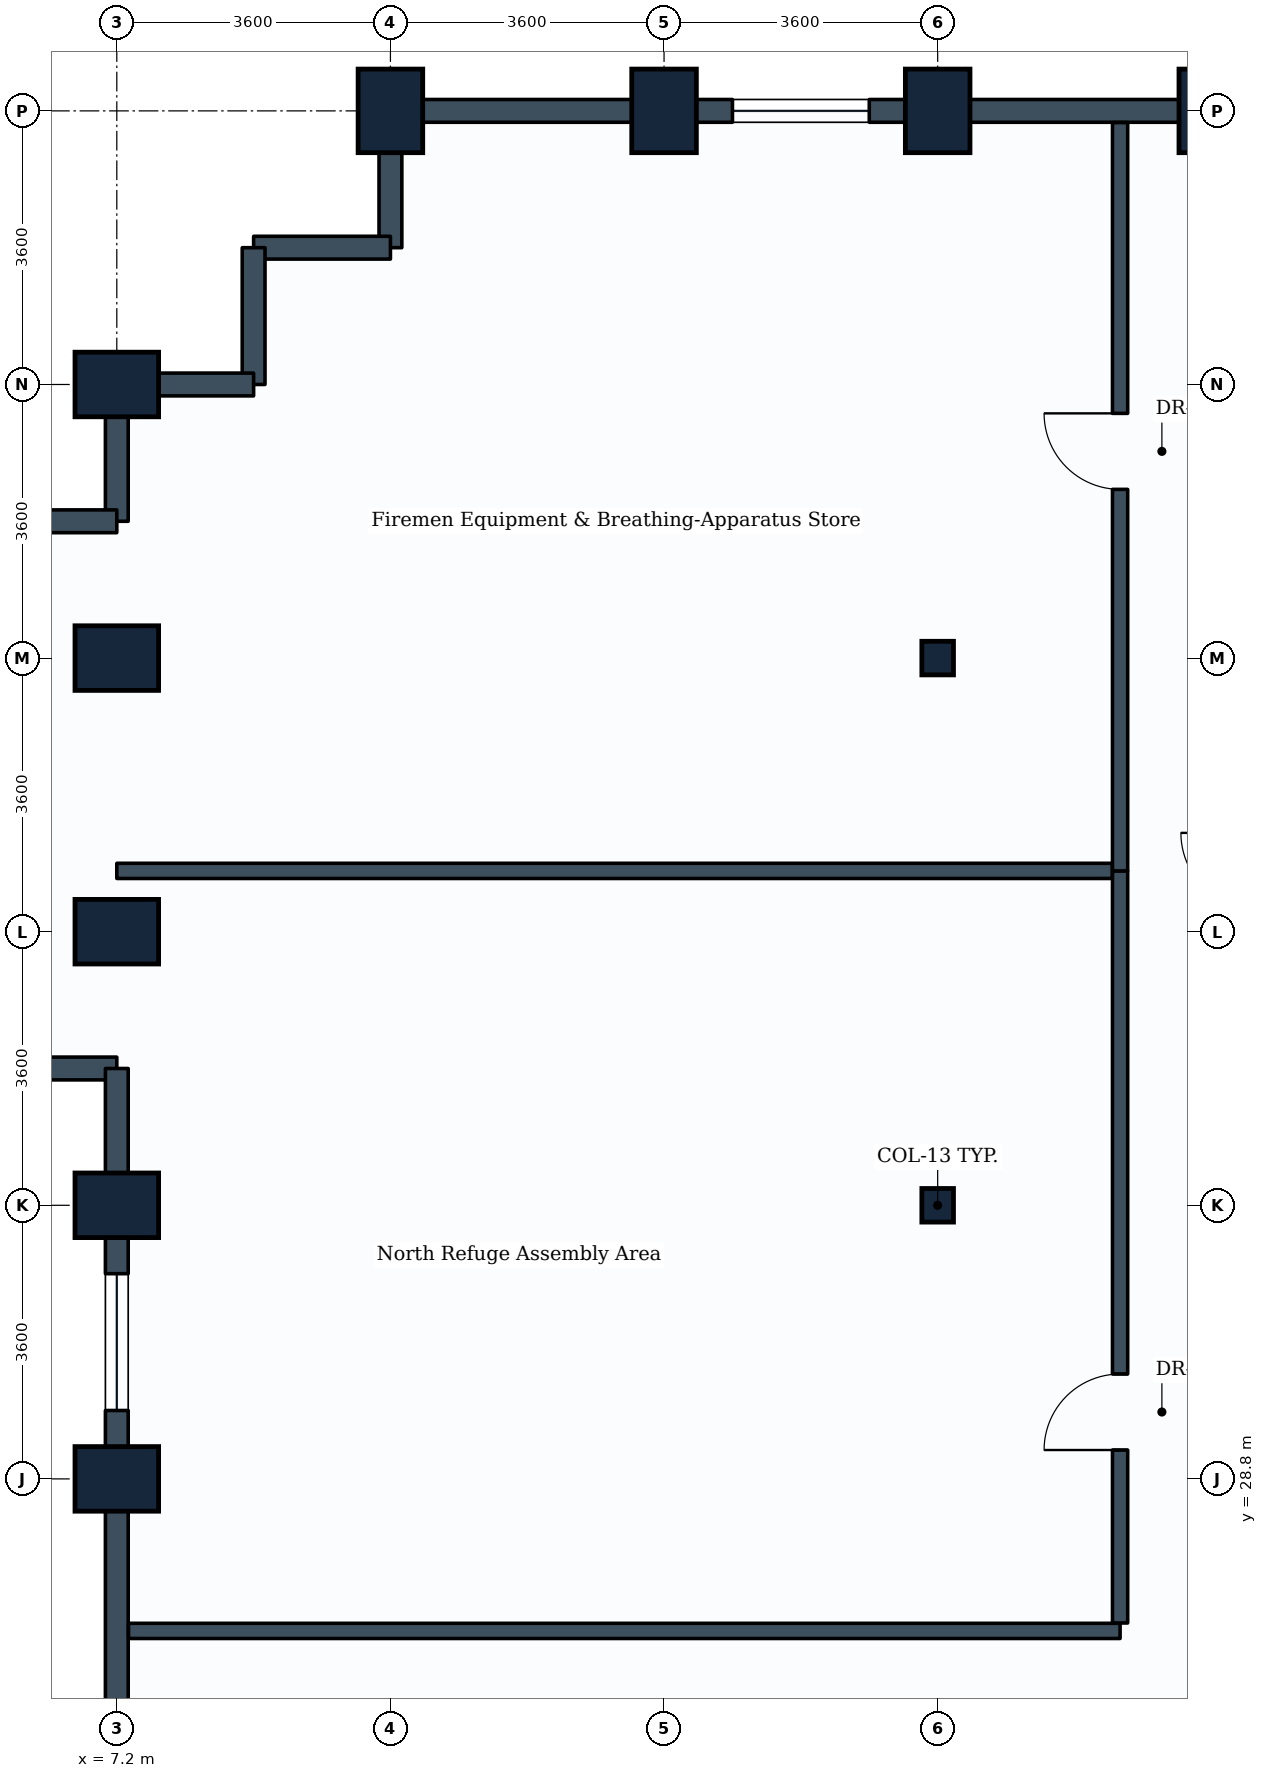
"""IFC4 building model, lengths in metres.
Left out: names, types, materials, properties, quantities, classifications, styles, units other than length and angle.
Written with IfcOpenShell. Run it as: python <this file> out.ifc"""

import sys

from ifc_helpers import new_model, si_unit, direction, frame, frame_2d, origin, origin_2d, place, context, subcontext, project, spatial, rectangle, i_section, extrude, element, fill, save


model = new_model("IFC4")
c1 = context("Model", 3, precision=1e-05, world=origin(), true_north=direction((0.0, 1.0)))
c2 = subcontext(c1, "Body", "Model", "MODEL_VIEW")
j1 = project(units=[si_unit("LENGTHUNIT", "METRE"), si_unit("PLANEANGLEUNIT", "RADIAN")], contexts=[c1])
p1 = place(None, origin())
s1 = spatial("IfcSite", under=j1, at=p1, CompositionType="ELEMENT")
p2 = place(p1, origin())
s2 = spatial("IfcBuilding", under=s1, at=p2, CompositionType="ELEMENT")
p3 = place(p2, frame((0.0, 0.0, 120.0)))
s3 = spatial("IfcBuildingStorey", under=s2, at=p3, CompositionType="ELEMENT", Elevation=120.0)
for number, where, z_axis, x_axis in (
    (1, (7.2, 28.8, 0.0), (0.0, 0.0, 1.0), (0.0, 1.0, 0.0)),
    (2, (7.2, 32.4, 0.0), (0.0, 0.0, 1.0), (0.0, 1.0, 0.0)),
    (3, (7.2, 36.0, 0.0), (0.0, 0.0, 1.0), (0.0, 1.0, 0.0)),
    (4, (7.2, 39.6, 0.0), (0.0, 0.0, 1.0), (0.0, 1.0, 0.0)),
    (5, (7.2, 43.2, 0.0), (0.0, 0.0, 1.0), (0.0, 1.0, 0.0)),
    (6, (10.8, 46.8, 0.0), (0.0, 0.0, 1.0), (1.0, 0.0, 0.0)),
    (7, (14.4, 46.8, 0.0), (0.0, 0.0, 1.0), (1.0, 0.0, 0.0)),
):
    element("IfcColumn", number, at=place(p3, frame(where, z_axis=z_axis, x_axis=x_axis)), inside=s3, PredefinedType="COLUMN", context=c2, shape_type="SweptSolid", body=[
        extrude(rectangle(XDim=0.85, YDim=1.1, at=origin_2d()), origin(), (0.0, 0.0, 1.0), 3.8),
    ])
for number, where, z_axis, x_axis in (
    (8, (18.0, 32.4, 0.0), (0.0, 0.0, 1.0), (1.0, 0.0, 0.0)),
    (9, (18.0, 39.6, 0.0), (0.0, 0.0, 1.0), (1.0, 0.0, 0.0)),
):
    element("IfcColumn", number, at=place(p3, frame(where, z_axis=z_axis, x_axis=x_axis)), inside=s3, PredefinedType="COLUMN", context=c2, shape_type="SweptSolid", body=[
        extrude(i_section(OverallWidth=0.416, OverallDepth=0.442, WebThickness=0.025, FlangeThickness=0.041, FilletRadius=0.015, at=origin_2d()), origin(), (0.0, 0.0, 1.0), 3.8),
    ])
for number, where, z_axis, x_axis in (
    (10, (18.0, 46.8, 0.0), (0.0, 0.0, 1.0), (1.0, 0.0, 0.0)),
    (11, (21.6, 46.8, 0.0), (0.0, 0.0, 1.0), (1.0, 0.0, 0.0)),
):
    element("IfcColumn", number, at=place(p3, frame(where, z_axis=z_axis, x_axis=x_axis)), inside=s3, PredefinedType="COLUMN", context=c2, shape_type="SweptSolid", body=[
        extrude(rectangle(XDim=0.85, YDim=1.1, at=origin_2d()), origin(), (0.0, 0.0, 1.0), 3.8),
    ])
p4 = place(p3, frame((18.0, 46.8, 0.0), z_axis=(0.0, 0.0, 1.0), x_axis=(1.0, 0.0, 0.0)))
e12 = element("IfcWall", 12, at=p4, inside=s3, PredefinedType="STANDARD", context=c2, shape_type="SweptSolid", body=[
    extrude(rectangle(XDim=3.6, YDim=0.3, at=frame_2d((1.8, 0.0))), origin(), (0.0, 0.0, 1.0), 2.93),
])
p5 = place(p3, frame((14.4, 46.8, 0.0), z_axis=(0.0, 0.0, 1.0), x_axis=(1.0, 0.0, 0.0)))
e13 = element("IfcWall", 13, at=p5, inside=s3, PredefinedType="STANDARD", context=c2, shape_type="SweptSolid", body=[
    extrude(rectangle(XDim=3.6, YDim=0.3, at=frame_2d((1.8, 0.0))), origin(), (0.0, 0.0, 1.0), 2.93),
])
p6 = place(p5, frame((0.9, 0.0, 0.85)))
e14 = element("IfcOpeningElement", 14, at=p6, cuts=e13, PredefinedType="OPENING", context=c2, shape_type="SweptSolid", body=[
    extrude(rectangle(XDim=1.8, YDim=1.35, at=frame_2d((0.9, 0.675))), frame((0.0, 0.16, 0.0), z_axis=(0.0, -1.0, 0.0), x_axis=(1.0, 0.0, 0.0)), (0.0, 0.0, 1.0), 0.32),
])
p7 = place(p3, frame((10.8, 46.8, 0.0), z_axis=(0.0, 0.0, 1.0), x_axis=(1.0, 0.0, 0.0)))
e15 = element("IfcWall", 15, at=p7, inside=s3, PredefinedType="STANDARD", context=c2, shape_type="SweptSolid", body=[
    extrude(rectangle(XDim=3.6, YDim=0.3, at=frame_2d((1.8, 0.0))), origin(), (0.0, 0.0, 1.0), 2.93),
])
p8 = place(p3, frame((10.8, 45.0, 0.0), z_axis=(0.0, 0.0, 1.0), x_axis=(0.0, 1.0, 0.0)))
e16 = element("IfcWall", 16, at=p8, inside=s3, PredefinedType="STANDARD", context=c2, shape_type="SweptSolid", body=[
    extrude(rectangle(XDim=1.8, YDim=0.3, at=frame_2d((0.9, 0.0))), origin(), (0.0, 0.0, 1.0), 2.93),
])
for number, where, z_axis, x_axis in (
    (17, (9.0, 45.0, 0.0), (0.0, 0.0, 1.0), (1.0, 0.0, 0.0)),
    (18, (9.0, 43.2, 0.0), (0.0, 0.0, 1.0), (0.0, 1.0, 0.0)),
):
    element("IfcWall", number, at=place(p3, frame(where, z_axis=z_axis, x_axis=x_axis)), inside=s3, PredefinedType="STANDARD", context=c2, shape_type="SweptSolid", body=[
        extrude(rectangle(XDim=1.8, YDim=0.3, at=frame_2d((0.9, 0.0))), origin(), (0.0, 0.0, 1.0), 3.535),
    ])
for number, where, z_axis, x_axis in (
    (19, (7.2, 43.2, 0.0), (0.0, 0.0, 1.0), (1.0, 0.0, 0.0)),
    (20, (7.2, 41.4, 0.0), (0.0, 0.0, 1.0), (0.0, 1.0, 0.0)),
):
    element("IfcWall", number, at=place(p3, frame(where, z_axis=z_axis, x_axis=x_axis)), inside=s3, PredefinedType="STANDARD", context=c2, shape_type="SweptSolid", body=[
        extrude(rectangle(XDim=1.8, YDim=0.3, at=frame_2d((0.9, 0.0))), origin(), (0.0, 0.0, 1.0), 2.93),
    ])
for number, where, z_axis, x_axis in (
    (21, (5.1, 41.4, 0.0), (0.0, 0.0, 1.0), (1.0, 0.0, 0.0)),
    (22, (5.1, 34.2, 0.0), (0.0, 0.0, 1.0), (1.0, 0.0, 0.0)),
):
    element("IfcWall", number, at=place(p3, frame(where, z_axis=z_axis, x_axis=x_axis)), inside=s3, PredefinedType="STANDARD", context=c2, shape_type="SweptSolid", body=[
        extrude(rectangle(XDim=2.1, YDim=0.3, at=frame_2d((1.05, 0.0))), origin(), (0.0, 0.0, 1.0), 2.93),
    ])
p9 = place(p3, frame((7.2, 32.4, 0.0), z_axis=(0.0, 0.0, 1.0), x_axis=(0.0, 1.0, 0.0)))
e23 = element("IfcWall", 23, at=p9, inside=s3, PredefinedType="STANDARD", context=c2, shape_type="SweptSolid", body=[
    extrude(rectangle(XDim=1.8, YDim=0.3, at=frame_2d((0.9, 0.0))), origin(), (0.0, 0.0, 1.0), 2.93),
])
p10 = place(p3, frame((7.2, 28.8, 0.0), z_axis=(0.0, 0.0, 1.0), x_axis=(0.0, 1.0, 0.0)))
e24 = element("IfcWall", 24, at=p10, inside=s3, PredefinedType="STANDARD", context=c2, shape_type="SweptSolid", body=[
    extrude(rectangle(XDim=3.6, YDim=0.3, at=frame_2d((1.8, 0.0))), origin(), (0.0, 0.0, 1.0), 2.93),
])
p11 = place(p10, frame((0.9, 0.0, 0.85)))
e25 = element("IfcOpeningElement", 25, at=p11, cuts=e24, PredefinedType="OPENING", context=c2, shape_type="SweptSolid", body=[
    extrude(rectangle(XDim=1.8, YDim=1.35, at=frame_2d((0.9, 0.675))), frame((0.0, 0.16, 0.0), z_axis=(0.0, -1.0, 0.0), x_axis=(1.0, 0.0, 0.0)), (0.0, 0.0, 1.0), 0.32),
])
p12 = place(p3, frame((7.2, 25.2, 0.0), z_axis=(0.0, 0.0, 1.0), x_axis=(0.0, 1.0, 0.0)))
e26 = element("IfcWall", 26, at=p12, inside=s3, PredefinedType="STANDARD", context=c2, shape_type="SweptSolid", body=[
    extrude(rectangle(XDim=3.6, YDim=0.3, at=frame_2d((1.8, 0.0))), origin(), (0.0, 0.0, 1.0), 2.93),
])
p13 = place(p3, frame((7.354, 26.8, 0.0), z_axis=(0.0, 0.0, 1.0), x_axis=(1.0, 0.0, 0.0)))
e27 = element("IfcWall", 27, at=p13, inside=s3, PredefinedType="PARTITIONING", context=c2, shape_type="SweptSolid", body=[
    extrude(rectangle(XDim=13.046, YDim=0.2, at=frame_2d((6.523, 0.0))), origin(), (0.0, 0.0, 1.0), 2.93),
])
p14 = place(p3, frame((20.4, 26.904, 0.0), z_axis=(0.0, 0.0, 1.0), x_axis=(0.0, 1.0, 0.0)))
e28 = element("IfcWall", 28, at=p14, inside=s3, PredefinedType="PARTITIONING", context=c2, shape_type="SweptSolid", body=[
    extrude(rectangle(XDim=9.896, YDim=0.2, at=frame_2d((4.948, 0.0))), origin(), (0.0, 0.0, 1.0), 3.09),
])
p15 = place(p14, frame((2.276, 0.0, 0.0)))
e29 = element("IfcOpeningElement", 29, at=p15, cuts=e28, PredefinedType="OPENING", context=c2, shape_type="SweptSolid", body=[
    extrude(rectangle(XDim=1.0, YDim=2.1, at=frame_2d((0.5, 1.05))), frame((0.0, 0.11, 0.0), z_axis=(0.0, -1.0, 0.0), x_axis=(1.0, 0.0, 0.0)), (0.0, 0.0, 1.0), 0.22),
])
p16 = place(p3, frame((20.4, 36.8, 0.0), z_axis=(0.0, 0.0, 1.0), x_axis=(0.0, 1.0, 0.0)))
e30 = element("IfcWall", 30, at=p16, inside=s3, PredefinedType="PARTITIONING", context=c2, shape_type="SweptSolid", body=[
    extrude(rectangle(XDim=9.846, YDim=0.2, at=frame_2d((4.923, 0.0))), origin(), (0.0, 0.0, 1.0), 2.93),
])
p17 = place(p16, frame((5.02, 0.0, 0.0)))
e31 = element("IfcOpeningElement", 31, at=p17, cuts=e30, PredefinedType="OPENING", context=c2, shape_type="SweptSolid", body=[
    extrude(rectangle(XDim=1.0, YDim=2.1, at=frame_2d((0.5, 1.05))), frame((0.0, 0.11, 0.0), z_axis=(0.0, -1.0, 0.0), x_axis=(1.0, 0.0, 0.0)), (0.0, 0.0, 1.0), 0.22),
])
p18 = place(p3, frame((7.2, 36.8, 0.0), z_axis=(0.0, 0.0, 1.0), x_axis=(1.0, 0.0, 0.0)))
e32 = element("IfcWall", 32, at=p18, inside=s3, PredefinedType="PARTITIONING", context=c2, shape_type="SweptSolid", body=[
    extrude(rectangle(XDim=13.096, YDim=0.2, at=frame_2d((6.548, 0.0))), origin(), (0.0, 0.0, 1.0), 2.93),
])
p19 = place(p6, origin())
e33 = element("IfcWindow", 33, at=p19, inside=s3, PartitioningType="SINGLE_PANEL", PredefinedType="WINDOW", context=c2, shape_type="SweptSolid", body=[
    extrude(rectangle(XDim=1.8, YDim=1.35, at=frame_2d((0.9, 0.675))), frame((0.0, 0.03, 0.0), z_axis=(0.0, -1.0, 0.0), x_axis=(1.0, 0.0, 0.0)), (0.0, 0.0, 1.0), 0.06),
])
fill(e14, e33)
p20 = place(p11, origin())
e34 = element("IfcWindow", 34, at=p20, inside=s3, PartitioningType="SINGLE_PANEL", PredefinedType="WINDOW", context=c2, shape_type="SweptSolid", body=[
    extrude(rectangle(XDim=1.8, YDim=1.35, at=frame_2d((0.9, 0.675))), frame((0.0, 0.03, 0.0), z_axis=(0.0, -1.0, 0.0), x_axis=(1.0, 0.0, 0.0)), (0.0, 0.0, 1.0), 0.06),
])
fill(e25, e34)
p21 = place(p15, origin())
e35 = element("IfcDoor", 35, at=p21, inside=s3, OperationType="SINGLE_SWING_LEFT", PredefinedType="DOOR", context=c2, shape_type="SweptSolid", body=[
    extrude(rectangle(XDim=1.0, YDim=2.1, at=frame_2d((0.5, 1.05))), frame((0.0, 0.025, 0.0), z_axis=(0.0, -1.0, 0.0), x_axis=(1.0, 0.0, 0.0)), (0.0, 0.0, 1.0), 0.05),
])
fill(e29, e35)
p22 = place(p17, origin())
e36 = element("IfcDoor", 36, at=p22, inside=s3, OperationType="SINGLE_SWING_RIGHT", PredefinedType="DOOR", context=c2, shape_type="SweptSolid", body=[
    extrude(rectangle(XDim=1.0, YDim=2.1, at=frame_2d((0.5, 1.05))), frame((0.0, 0.025, 0.0), z_axis=(0.0, -1.0, 0.0), x_axis=(1.0, 0.0, 0.0)), (0.0, 0.0, 1.0), 0.05),
])
fill(e31, e36)
save(model, sys.argv[1])
